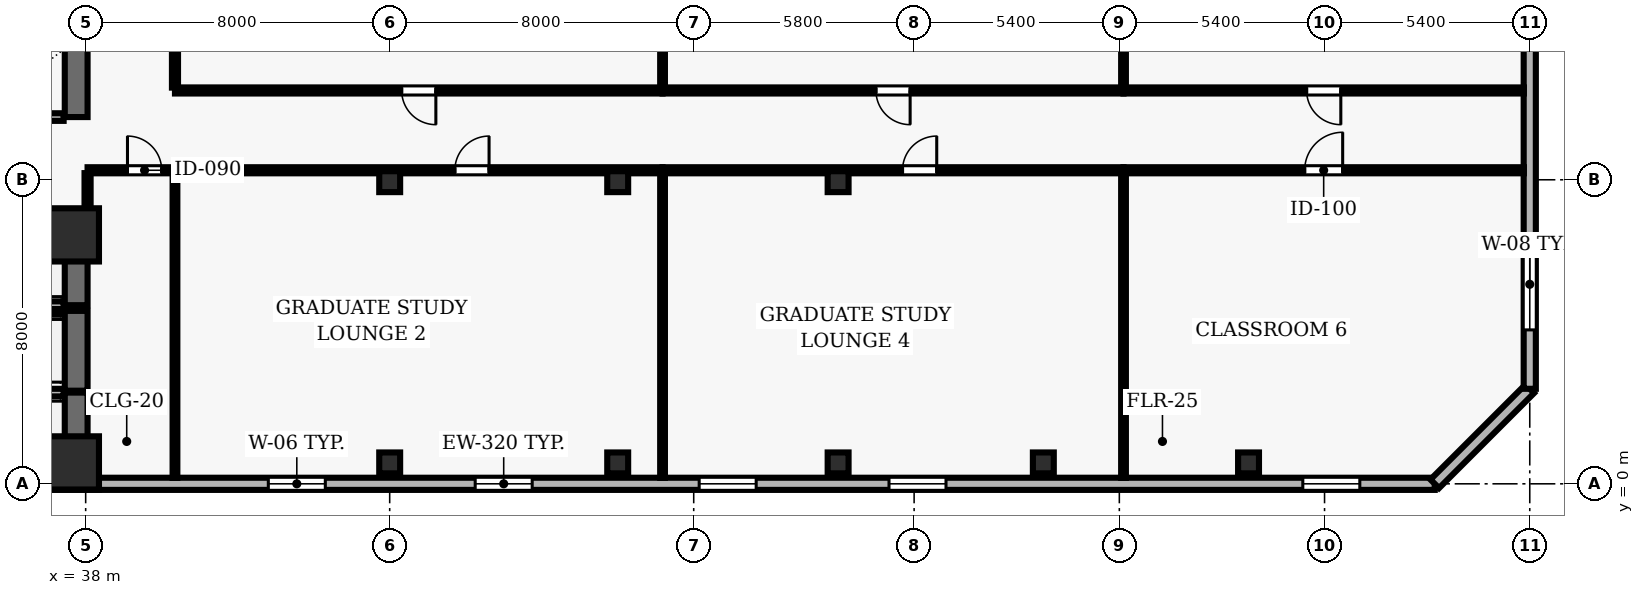
"""IFC4 building model, lengths in metres.
Left out: names, types, materials, properties, quantities, classifications, styles, units other than length and angle.
Written with IfcOpenShell. Run it as: python <this file> out.ifc"""

import sys

from ifc_helpers import new_model, si_unit, direction, frame, frame_2d, origin, origin_2d, place, context, subcontext, project, spatial, rectangle, hollow_rectangle, extrude, element, fill, save


model = new_model("IFC4")
c1 = context("Model", 3, precision=1e-05, world=origin(), true_north=direction((0.0, 1.0)))
c2 = subcontext(c1, "Body", "Model", "MODEL_VIEW")
j1 = project(units=[si_unit("LENGTHUNIT", "METRE"), si_unit("PLANEANGLEUNIT", "RADIAN")], contexts=[c1])
p1 = place(None, origin())
s1 = spatial("IfcSite", under=j1, at=p1, CompositionType="ELEMENT")
p2 = place(p1, origin())
s2 = spatial("IfcBuilding", under=s1, at=p2, CompositionType="ELEMENT")
p3 = place(p2, frame((0.0, 0.0, 73.9)))
s3 = spatial("IfcBuildingStorey", under=s2, at=p3, CompositionType="ELEMENT", Elevation=73.9)
for number, where, z_axis, x_axis in (
    (1, (37.65, 0.55, 0.0), (0.0, 0.0, 1.0), (1.0, 0.0, 0.0)),
    (2, (37.65, 6.55, 0.0), (0.0, 0.0, 1.0), (1.0, 0.0, 0.0)),
):
    element("IfcColumn", number, at=place(p3, frame(where, z_axis=z_axis, x_axis=x_axis)), inside=s3, PredefinedType="COLUMN", context=c2, shape_type="SweptSolid", body=[
        extrude(rectangle(XDim=1.4, YDim=1.4, at=origin_2d()), origin(), (0.0, 0.0, 1.0), 3.9),
    ])
for number, where, z_axis, x_axis in (
    (3, (46.0, 0.55, 0.0), (0.0, 0.0, 1.0), (1.0, 0.0, 0.0)),
    (4, (46.0, 7.95, 0.0), (0.0, 0.0, 1.0), (1.0, 0.0, 0.0)),
    (5, (52.0, 0.55, 0.0), (0.0, 0.0, 1.0), (1.0, 0.0, 0.0)),
    (6, (52.0, 7.95, 0.0), (0.0, 0.0, 1.0), (1.0, 0.0, 0.0)),
    (7, (57.8, 0.55, 0.0), (0.0, 0.0, 1.0), (1.0, 0.0, 0.0)),
    (8, (57.8, 7.95, 0.0), (0.0, 0.0, 1.0), (1.0, 0.0, 0.0)),
    (9, (63.2, 0.55, 0.0), (0.0, 0.0, 1.0), (1.0, 0.0, 0.0)),
    (10, (68.6, 0.55, 0.0), (0.0, 0.0, 1.0), (1.0, 0.0, 0.0)),
):
    element("IfcColumn", number, at=place(p3, frame(where, z_axis=z_axis, x_axis=x_axis)), inside=s3, PredefinedType="COLUMN", context=c2, shape_type="SweptSolid", body=[
        extrude(hollow_rectangle(XDim=0.55, YDim=0.55, WallThickness=0.025, at=origin_2d()), origin(), (0.0, 0.0, 1.0), 3.9),
    ])
p4 = place(p3, frame((24.5, 0.0, 0.0), z_axis=(0.0, 0.0, 1.0), x_axis=(1.0, 0.0, 0.0)))
e11 = element("IfcWall", 11, at=p4, inside=s3, PredefinedType="SOLIDWALL", context=c2, shape_type="SweptSolid", body=[
    extrude(rectangle(XDim=49.0, YDim=0.32, at=frame_2d((24.5, 0.0))), origin(), (0.0, 0.0, 1.0), 3.69),
])
p5 = place(p4, frame((1.972, 0.0, 0.9)))
e12 = element("IfcOpeningElement", 12, at=p5, cuts=e11, PredefinedType="OPENING", context=c2, shape_type="SweptSolid", body=[
    extrude(rectangle(XDim=1.5, YDim=1.8, at=frame_2d((0.75, 0.9))), frame((0.0, 0.17, 0.0), z_axis=(0.0, -1.0, 0.0), x_axis=(1.0, 0.0, 0.0)), (0.0, 0.0, 1.0), 0.34),
])
p6 = place(p4, frame((8.317, 0.0, 0.9)))
e13 = element("IfcOpeningElement", 13, at=p6, cuts=e11, PredefinedType="OPENING", context=c2, shape_type="SweptSolid", body=[
    extrude(rectangle(XDim=1.5, YDim=1.8, at=frame_2d((0.75, 0.9))), frame((0.0, 0.17, 0.0), z_axis=(0.0, -1.0, 0.0), x_axis=(1.0, 0.0, 0.0)), (0.0, 0.0, 1.0), 0.34),
])
p7 = place(p4, frame((18.306, 0.0, 0.9)))
e14 = element("IfcOpeningElement", 14, at=p7, cuts=e11, PredefinedType="OPENING", context=c2, shape_type="SweptSolid", body=[
    extrude(rectangle(XDim=1.5, YDim=1.8, at=frame_2d((0.75, 0.9))), frame((0.0, 0.17, 0.0), z_axis=(0.0, -1.0, 0.0), x_axis=(1.0, 0.0, 0.0)), (0.0, 0.0, 1.0), 0.34),
])
p8 = place(p4, frame((23.75, 0.0, 0.9)))
e15 = element("IfcOpeningElement", 15, at=p8, cuts=e11, PredefinedType="OPENING", context=c2, shape_type="SweptSolid", body=[
    extrude(rectangle(XDim=1.5, YDim=1.8, at=frame_2d((0.75, 0.9))), frame((0.0, 0.17, 0.0), z_axis=(0.0, -1.0, 0.0), x_axis=(1.0, 0.0, 0.0)), (0.0, 0.0, 1.0), 0.34),
])
p9 = place(p4, frame((29.644, 0.0, 0.9)))
e16 = element("IfcOpeningElement", 16, at=p9, cuts=e11, PredefinedType="OPENING", context=c2, shape_type="SweptSolid", body=[
    extrude(rectangle(XDim=1.5, YDim=1.8, at=frame_2d((0.75, 0.9))), frame((0.0, 0.17, 0.0), z_axis=(0.0, -1.0, 0.0), x_axis=(1.0, 0.0, 0.0)), (0.0, 0.0, 1.0), 0.34),
])
p10 = place(p4, frame((34.639, 0.0, 0.9)))
e17 = element("IfcOpeningElement", 17, at=p10, cuts=e11, PredefinedType="OPENING", context=c2, shape_type="SweptSolid", body=[
    extrude(rectangle(XDim=1.5, YDim=1.8, at=frame_2d((0.75, 0.9))), frame((0.0, 0.17, 0.0), z_axis=(0.0, -1.0, 0.0), x_axis=(1.0, 0.0, 0.0)), (0.0, 0.0, 1.0), 0.34),
])
p11 = place(p4, frame((45.528, 0.0, 0.9)))
e18 = element("IfcOpeningElement", 18, at=p11, cuts=e11, PredefinedType="OPENING", context=c2, shape_type="SweptSolid", body=[
    extrude(rectangle(XDim=1.5, YDim=1.8, at=frame_2d((0.75, 0.9))), frame((0.0, 0.17, 0.0), z_axis=(0.0, -1.0, 0.0), x_axis=(1.0, 0.0, 0.0)), (0.0, 0.0, 1.0), 0.34),
])
p12 = place(p3, frame((73.5, 0.0, 0.0), z_axis=(0.0, 0.0, 1.0), x_axis=(0.707106781187, 0.707106781187, 0.0)))
e19 = element("IfcWall", 19, at=p12, inside=s3, PredefinedType="SOLIDWALL", context=c2, shape_type="SweptSolid", body=[
    extrude(rectangle(XDim=3.536, YDim=0.32, at=frame_2d((1.768, 0.0))), origin(), (0.0, 0.0, 1.0), 3.69),
])
p13 = place(p3, frame((76.0, 2.5, 0.0), z_axis=(0.0, 0.0, 1.0), x_axis=(0.0, 1.0, 0.0)))
e20 = element("IfcWall", 20, at=p13, inside=s3, PredefinedType="SOLIDWALL", context=c2, shape_type="SweptSolid", body=[
    extrude(rectangle(XDim=11.0, YDim=0.32, at=frame_2d((5.5, 0.0))), origin(), (0.0, 0.0, 1.0), 3.69),
])
p14 = place(p13, frame((1.55, 0.0, 0.9)))
e21 = element("IfcOpeningElement", 21, at=p14, cuts=e20, PredefinedType="OPENING", context=c2, shape_type="SweptSolid", body=[
    extrude(rectangle(XDim=2.4, YDim=1.8, at=frame_2d((1.2, 0.9))), frame((0.0, 0.17, 0.0), z_axis=(0.0, -1.0, 0.0), x_axis=(1.0, 0.0, 0.0)), (0.0, 0.0, 1.0), 0.34),
])
p15 = place(p3, frame((37.75, 0.3, 0.0), z_axis=(0.0, 0.0, 1.0), x_axis=(0.0, 1.0, 0.0)))
e22 = element("IfcWall", 22, at=p15, inside=s3, PredefinedType="SHEAR", context=c2, shape_type="SweptSolid", body=[
    extrude(rectangle(XDim=2.1, YDim=0.6, at=frame_2d((1.05, 0.0))), origin(), (0.0, 0.0, 1.0), 3.69),
])
for number, where, z_axis, x_axis in (
    (23, (35.28, 0.3, 0.0), (0.0, 0.0, 1.0), (1.0, 0.0, 0.0)),
    (24, (37.42, 2.4, 0.0), (0.0, 0.0, 1.0), (-1.0, 0.0, 0.0)),
):
    element("IfcWall", number, at=place(p3, frame(where, z_axis=z_axis, x_axis=x_axis)), inside=s3, PredefinedType="SOLIDWALL", context=c2, shape_type="SweptSolid", body=[
        extrude(rectangle(XDim=2.14, YDim=0.2, at=frame_2d((1.07, 0.0))), origin(), (0.0, 0.0, 1.0), 3.69),
    ])
p16 = place(p3, frame((37.75, 2.45, 0.0), z_axis=(0.0, 0.0, 1.0), x_axis=(0.0, 1.0, 0.0)))
e25 = element("IfcWall", 25, at=p16, inside=s3, PredefinedType="SHEAR", context=c2, shape_type="SweptSolid", body=[
    extrude(rectangle(XDim=2.1, YDim=0.6, at=frame_2d((1.05, 0.0))), origin(), (0.0, 0.0, 1.0), 3.69),
])
p17 = place(p3, frame((37.42, 4.55, 0.0), z_axis=(0.0, 0.0, 1.0), x_axis=(-1.0, 0.0, 0.0)))
e26 = element("IfcWall", 26, at=p17, inside=s3, PredefinedType="SOLIDWALL", context=c2, shape_type="SweptSolid", body=[
    extrude(rectangle(XDim=2.14, YDim=0.2, at=frame_2d((1.07, 0.0))), origin(), (0.0, 0.0, 1.0), 3.69),
])
p18 = place(p3, frame((37.75, 4.7, 0.0), z_axis=(0.0, 0.0, 1.0), x_axis=(0.0, 1.0, 0.0)))
e27 = element("IfcWall", 27, at=p18, inside=s3, PredefinedType="SHEAR", context=c2, shape_type="SweptSolid", body=[
    extrude(rectangle(XDim=2.25, YDim=0.6, at=frame_2d((1.125, 0.0))), origin(), (0.0, 0.0, 1.0), 3.69),
])
for number, where, z_axis, x_axis in (
    (28, (35.28, 4.7, 0.0), (0.0, 0.0, 1.0), (1.0, 0.0, 0.0)),
    (29, (37.42, 6.95, 0.0), (0.0, 0.0, 1.0), (-1.0, 0.0, 0.0)),
):
    element("IfcWall", number, at=place(p3, frame(where, z_axis=z_axis, x_axis=x_axis)), inside=s3, PredefinedType="SOLIDWALL", context=c2, shape_type="SweptSolid", body=[
        extrude(rectangle(XDim=2.14, YDim=0.2, at=frame_2d((1.07, 0.0))), origin(), (0.0, 0.0, 1.0), 3.69),
    ])
p19 = place(p3, frame((37.75, 9.65, 0.0), z_axis=(0.0, 0.0, 1.0), x_axis=(0.0, 1.0, 0.0)))
e30 = element("IfcWall", 30, at=p19, inside=s3, PredefinedType="SHEAR", context=c2, shape_type="SweptSolid", body=[
    extrude(rectangle(XDim=1.9, YDim=0.6, at=frame_2d((0.95, 0.0))), origin(), (0.0, 0.0, 1.0), 3.69),
])
p20 = place(p3, frame((35.28, 9.65, 0.0), z_axis=(0.0, 0.0, 1.0), x_axis=(1.0, 0.0, 0.0)))
e31 = element("IfcWall", 31, at=p20, inside=s3, PredefinedType="SOLIDWALL", context=c2, shape_type="SweptSolid", body=[
    extrude(rectangle(XDim=2.14, YDim=0.2, at=frame_2d((1.07, 0.0))), origin(), (0.0, 0.0, 1.0), 3.69),
])
p21 = place(p3, frame((38.05, 8.25, 0.0), z_axis=(0.0, 0.0, 1.0), x_axis=(1.0, 0.0, 0.0)))
e32 = element("IfcWall", 32, at=p21, inside=s3, PredefinedType="PARTITIONING", context=c2, shape_type="SweptSolid", body=[
    extrude(rectangle(XDim=2.3, YDim=0.16, at=frame_2d((1.15, 0.0))), origin(), (0.0, 0.0, 1.0), 3.055),
])
p22 = place(p21, frame((1.05, 0.0, 0.0)))
e33 = element("IfcOpeningElement", 33, at=p22, cuts=e32, PredefinedType="OPENING", context=c2, shape_type="SweptSolid", body=[
    extrude(rectangle(XDim=0.9, YDim=2.1, at=frame_2d((0.45, 1.05))), frame((0.0, 0.09, 0.0), z_axis=(0.0, -1.0, 0.0), x_axis=(1.0, 0.0, 0.0)), (0.0, 0.0, 1.0), 0.18),
])
p23 = place(p3, frame((40.35, 8.25, 0.0), z_axis=(0.0, 0.0, 1.0), x_axis=(1.0, 0.0, 0.0)))
e34 = element("IfcWall", 34, at=p23, inside=s3, PredefinedType="PARTITIONING", context=c2, shape_type="SweptSolid", body=[
    extrude(rectangle(XDim=12.83, YDim=0.16, at=frame_2d((6.415, 0.0))), origin(), (0.0, 0.0, 1.0), 3.055),
])
p24 = place(p23, frame((7.365, 0.0, 0.0)))
e35 = element("IfcOpeningElement", 35, at=p24, cuts=e34, PredefinedType="OPENING", context=c2, shape_type="SweptSolid", body=[
    extrude(rectangle(XDim=0.9, YDim=2.1, at=frame_2d((0.45, 1.05))), frame((0.0, 0.09, 0.0), z_axis=(0.0, -1.0, 0.0), x_axis=(1.0, 0.0, 0.0)), (0.0, 0.0, 1.0), 0.18),
])
p25 = place(p3, frame((53.18, 8.25, 0.0), z_axis=(0.0, 0.0, 1.0), x_axis=(1.0, 0.0, 0.0)))
e36 = element("IfcWall", 36, at=p25, inside=s3, PredefinedType="PARTITIONING", context=c2, shape_type="SweptSolid", body=[
    extrude(rectangle(XDim=12.13, YDim=0.16, at=frame_2d((6.065, 0.0))), origin(), (0.0, 0.0, 1.0), 3.055),
])
p26 = place(p25, frame((6.315, 0.0, 0.0)))
e37 = element("IfcOpeningElement", 37, at=p26, cuts=e36, PredefinedType="OPENING", context=c2, shape_type="SweptSolid", body=[
    extrude(rectangle(XDim=0.9, YDim=2.1, at=frame_2d((0.45, 1.05))), frame((0.0, 0.09, 0.0), z_axis=(0.0, -1.0, 0.0), x_axis=(1.0, 0.0, 0.0)), (0.0, 0.0, 1.0), 0.18),
])
p27 = place(p3, frame((53.18, 10.35, 0.0), z_axis=(0.0, 0.0, 1.0), x_axis=(-1.0, 0.0, 0.0)))
e38 = element("IfcWall", 38, at=p27, inside=s3, PredefinedType="PARTITIONING", context=c2, shape_type="SweptSolid", body=[
    extrude(rectangle(XDim=12.83, YDim=0.16, at=frame_2d((6.415, 0.0))), origin(), (0.0, 0.0, 1.0), 3.277),
])
p28 = place(p27, frame((5.965, 0.0, 0.0)))
e39 = element("IfcOpeningElement", 39, at=p28, cuts=e38, PredefinedType="OPENING", context=c2, shape_type="SweptSolid", body=[
    extrude(rectangle(XDim=0.9, YDim=2.1, at=frame_2d((0.45, 1.05))), frame((0.0, 0.09, 0.0), z_axis=(0.0, -1.0, 0.0), x_axis=(1.0, 0.0, 0.0)), (0.0, 0.0, 1.0), 0.18),
])
p29 = place(p3, frame((65.31, 8.25, 0.0), z_axis=(0.0, 0.0, 1.0), x_axis=(1.0, 0.0, 0.0)))
e40 = element("IfcWall", 40, at=p29, inside=s3, PredefinedType="PARTITIONING", context=c2, shape_type="SweptSolid", body=[
    extrude(rectangle(XDim=10.535, YDim=0.16, at=frame_2d((5.268, 0.0))), origin(), (0.0, 0.0, 1.0), 3.69),
])
p30 = place(p29, frame((4.767, 0.0, 0.0)))
e41 = element("IfcOpeningElement", 41, at=p30, cuts=e40, PredefinedType="OPENING", context=c2, shape_type="SweptSolid", body=[
    extrude(rectangle(XDim=1.0, YDim=2.1, at=frame_2d((0.5, 1.05))), frame((0.0, 0.09, 0.0), z_axis=(0.0, -1.0, 0.0), x_axis=(1.0, 0.0, 0.0)), (0.0, 0.0, 1.0), 0.18),
])
p31 = place(p3, frame((65.31, 10.35, 0.0), z_axis=(0.0, 0.0, 1.0), x_axis=(-1.0, 0.0, 0.0)))
e42 = element("IfcWall", 42, at=p31, inside=s3, PredefinedType="PARTITIONING", context=c2, shape_type="SweptSolid", body=[
    extrude(rectangle(XDim=12.13, YDim=0.16, at=frame_2d((6.065, 0.0))), origin(), (0.0, 0.0, 1.0), 3.277),
])
p32 = place(p31, frame((5.615, 0.0, 0.0)))
e43 = element("IfcOpeningElement", 43, at=p32, cuts=e42, PredefinedType="OPENING", context=c2, shape_type="SweptSolid", body=[
    extrude(rectangle(XDim=0.9, YDim=2.1, at=frame_2d((0.45, 1.05))), frame((0.0, 0.09, 0.0), z_axis=(0.0, -1.0, 0.0), x_axis=(1.0, 0.0, 0.0)), (0.0, 0.0, 1.0), 0.18),
])
p33 = place(p3, frame((75.845, 10.35, 0.0), z_axis=(0.0, 0.0, 1.0), x_axis=(-1.0, 0.0, 0.0)))
e44 = element("IfcWall", 44, at=p33, inside=s3, PredefinedType="PARTITIONING", context=c2, shape_type="SweptSolid", body=[
    extrude(rectangle(XDim=10.535, YDim=0.16, at=frame_2d((5.268, 0.0))), origin(), (0.0, 0.0, 1.0), 3.277),
])
p34 = place(p33, frame((4.817, 0.0, 0.0)))
e45 = element("IfcOpeningElement", 45, at=p34, cuts=e44, PredefinedType="OPENING", context=c2, shape_type="SweptSolid", body=[
    extrude(rectangle(XDim=0.9, YDim=2.1, at=frame_2d((0.45, 1.05))), frame((0.0, 0.09, 0.0), z_axis=(0.0, -1.0, 0.0), x_axis=(1.0, 0.0, 0.0)), (0.0, 0.0, 1.0), 0.18),
])
p35 = place(p3, frame((38.05, 7.05, 0.0), z_axis=(0.0, 0.0, 1.0), x_axis=(0.0, 1.0, 0.0)))
e46 = element("IfcWall", 46, at=p35, inside=s3, PredefinedType="PARTITIONING", context=c2, shape_type="SweptSolid", body=[
    extrude(rectangle(XDim=1.125, YDim=0.16, at=frame_2d((0.562, 0.0))), origin(), (0.0, 0.0, 1.0), 3.055),
])
p36 = place(p3, frame((40.35, 0.155, 0.0), z_axis=(0.0, 0.0, 1.0), x_axis=(0.0, 1.0, 0.0)))
e47 = element("IfcWall", 47, at=p36, inside=s3, PredefinedType="PARTITIONING", context=c2, shape_type="SweptSolid", body=[
    extrude(rectangle(XDim=8.02, YDim=0.125, at=frame_2d((4.01, 0.0))), origin(), (0.0, 0.0, 1.0), 3.69),
])
p37 = place(p3, frame((40.35, 10.425, 0.0), z_axis=(0.0, 0.0, 1.0), x_axis=(0.0, 1.0, 0.0)))
e48 = element("IfcWall", 48, at=p37, inside=s3, PredefinedType="PARTITIONING", context=c2, shape_type="SweptSolid", body=[
    extrude(rectangle(XDim=5.5, YDim=0.16, at=frame_2d((2.75, 0.0))), origin(), (0.0, 0.0, 1.0), 3.277),
])
p38 = place(p3, frame((53.18, 0.155, 0.0), z_axis=(0.0, 0.0, 1.0), x_axis=(0.0, 1.0, 0.0)))
e49 = element("IfcWall", 49, at=p38, inside=s3, PredefinedType="PARTITIONING", context=c2, shape_type="SweptSolid", body=[
    extrude(rectangle(XDim=8.02, YDim=0.125, at=frame_2d((4.01, 0.0))), origin(), (0.0, 0.0, 1.0), 3.69),
])
p39 = place(p3, frame((53.18, 10.425, 0.0), z_axis=(0.0, 0.0, 1.0), x_axis=(0.0, 1.0, 0.0)))
e50 = element("IfcWall", 50, at=p39, inside=s3, PredefinedType="PARTITIONING", context=c2, shape_type="SweptSolid", body=[
    extrude(rectangle(XDim=5.42, YDim=0.125, at=frame_2d((2.71, 0.0))), origin(), (0.0, 0.0, 1.0), 3.69),
])
p40 = place(p3, frame((65.31, 0.155, 0.0), z_axis=(0.0, 0.0, 1.0), x_axis=(0.0, 1.0, 0.0)))
e51 = element("IfcWall", 51, at=p40, inside=s3, PredefinedType="PARTITIONING", context=c2, shape_type="SweptSolid", body=[
    extrude(rectangle(XDim=8.02, YDim=0.125, at=frame_2d((4.01, 0.0))), origin(), (0.0, 0.0, 1.0), 3.69),
])
p41 = place(p3, frame((65.31, 10.425, 0.0), z_axis=(0.0, 0.0, 1.0), x_axis=(0.0, 1.0, 0.0)))
e52 = element("IfcWall", 52, at=p41, inside=s3, PredefinedType="PARTITIONING", context=c2, shape_type="SweptSolid", body=[
    extrude(rectangle(XDim=5.42, YDim=0.125, at=frame_2d((2.71, 0.0))), origin(), (0.0, 0.0, 1.0), 3.69),
])
p42 = place(p7, origin())
e53 = element("IfcWindow", 53, at=p42, inside=s3, PartitioningType="SINGLE_PANEL", PredefinedType="WINDOW", context=c2, shape_type="SweptSolid", body=[
    extrude(rectangle(XDim=1.5, YDim=1.8, at=frame_2d((0.75, 0.9))), frame((0.0, 0.03, 0.0), z_axis=(0.0, -1.0, 0.0), x_axis=(1.0, 0.0, 0.0)), (0.0, 0.0, 1.0), 0.06),
])
fill(e14, e53)
p43 = place(p8, origin())
e54 = element("IfcWindow", 54, at=p43, inside=s3, PartitioningType="SINGLE_PANEL", PredefinedType="WINDOW", context=c2, shape_type="SweptSolid", body=[
    extrude(rectangle(XDim=1.5, YDim=1.8, at=frame_2d((0.75, 0.9))), frame((0.0, 0.03, 0.0), z_axis=(0.0, -1.0, 0.0), x_axis=(1.0, 0.0, 0.0)), (0.0, 0.0, 1.0), 0.06),
])
fill(e15, e54)
p44 = place(p9, origin())
e55 = element("IfcWindow", 55, at=p44, inside=s3, PartitioningType="SINGLE_PANEL", PredefinedType="WINDOW", context=c2, shape_type="SweptSolid", body=[
    extrude(rectangle(XDim=1.5, YDim=1.8, at=frame_2d((0.75, 0.9))), frame((0.0, 0.03, 0.0), z_axis=(0.0, -1.0, 0.0), x_axis=(1.0, 0.0, 0.0)), (0.0, 0.0, 1.0), 0.06),
])
fill(e16, e55)
p45 = place(p10, origin())
e56 = element("IfcWindow", 56, at=p45, inside=s3, PartitioningType="SINGLE_PANEL", PredefinedType="WINDOW", context=c2, shape_type="SweptSolid", body=[
    extrude(rectangle(XDim=1.5, YDim=1.8, at=frame_2d((0.75, 0.9))), frame((0.0, 0.03, 0.0), z_axis=(0.0, -1.0, 0.0), x_axis=(1.0, 0.0, 0.0)), (0.0, 0.0, 1.0), 0.06),
])
fill(e17, e56)
p46 = place(p11, origin())
e57 = element("IfcWindow", 57, at=p46, inside=s3, PartitioningType="SINGLE_PANEL", PredefinedType="WINDOW", context=c2, shape_type="SweptSolid", body=[
    extrude(rectangle(XDim=1.5, YDim=1.8, at=frame_2d((0.75, 0.9))), frame((0.0, 0.03, 0.0), z_axis=(0.0, -1.0, 0.0), x_axis=(1.0, 0.0, 0.0)), (0.0, 0.0, 1.0), 0.06),
])
fill(e18, e57)
p47 = place(p14, origin())
e58 = element("IfcWindow", 58, at=p47, inside=s3, PartitioningType="SINGLE_PANEL", PredefinedType="WINDOW", context=c2, shape_type="SweptSolid", body=[
    extrude(rectangle(XDim=2.4, YDim=1.8, at=frame_2d((1.2, 0.9))), frame((0.0, 0.03, 0.0), z_axis=(0.0, -1.0, 0.0), x_axis=(1.0, 0.0, 0.0)), (0.0, 0.0, 1.0), 0.06),
])
fill(e21, e58)
p48 = place(p22, origin())
e59 = element("IfcDoor", 59, at=p48, inside=s3, OperationType="SINGLE_SWING_LEFT", PredefinedType="DOOR", context=c2, shape_type="SweptSolid", body=[
    extrude(rectangle(XDim=0.9, YDim=2.1, at=frame_2d((0.45, 1.05))), frame((0.0, 0.025, 0.0), z_axis=(0.0, -1.0, 0.0), x_axis=(1.0, 0.0, 0.0)), (0.0, 0.0, 1.0), 0.05),
])
fill(e33, e59)
p49 = place(p24, origin())
e60 = element("IfcDoor", 60, at=p49, inside=s3, OperationType="SINGLE_SWING_RIGHT", PredefinedType="DOOR", context=c2, shape_type="SweptSolid", body=[
    extrude(rectangle(XDim=0.9, YDim=2.1, at=frame_2d((0.45, 1.05))), frame((0.0, 0.025, 0.0), z_axis=(0.0, -1.0, 0.0), x_axis=(1.0, 0.0, 0.0)), (0.0, 0.0, 1.0), 0.05),
])
fill(e35, e60)
p50 = place(p28, origin())
e61 = element("IfcDoor", 61, at=p50, inside=s3, OperationType="SINGLE_SWING_LEFT", PredefinedType="DOOR", context=c2, shape_type="SweptSolid", body=[
    extrude(rectangle(XDim=0.9, YDim=2.1, at=frame_2d((0.45, 1.05))), frame((0.0, 0.025, 0.0), z_axis=(0.0, -1.0, 0.0), x_axis=(1.0, 0.0, 0.0)), (0.0, 0.0, 1.0), 0.05),
])
fill(e39, e61)
p51 = place(p26, origin())
e62 = element("IfcDoor", 62, at=p51, inside=s3, OperationType="SINGLE_SWING_RIGHT", PredefinedType="DOOR", context=c2, shape_type="SweptSolid", body=[
    extrude(rectangle(XDim=0.9, YDim=2.1, at=frame_2d((0.45, 1.05))), frame((0.0, 0.025, 0.0), z_axis=(0.0, -1.0, 0.0), x_axis=(1.0, 0.0, 0.0)), (0.0, 0.0, 1.0), 0.05),
])
fill(e37, e62)
p52 = place(p32, origin())
e63 = element("IfcDoor", 63, at=p52, inside=s3, OperationType="SINGLE_SWING_LEFT", PredefinedType="DOOR", context=c2, shape_type="SweptSolid", body=[
    extrude(rectangle(XDim=0.9, YDim=2.1, at=frame_2d((0.45, 1.05))), frame((0.0, 0.025, 0.0), z_axis=(0.0, -1.0, 0.0), x_axis=(1.0, 0.0, 0.0)), (0.0, 0.0, 1.0), 0.05),
])
fill(e43, e63)
p53 = place(p30, origin())
e64 = element("IfcDoor", 64, at=p53, inside=s3, OperationType="SINGLE_SWING_RIGHT", PredefinedType="DOOR", context=c2, shape_type="SweptSolid", body=[
    extrude(rectangle(XDim=1.0, YDim=2.1, at=frame_2d((0.5, 1.05))), frame((0.0, 0.025, 0.0), z_axis=(0.0, -1.0, 0.0), x_axis=(1.0, 0.0, 0.0)), (0.0, 0.0, 1.0), 0.05),
])
fill(e41, e64)
p54 = place(p34, origin())
e65 = element("IfcDoor", 65, at=p54, inside=s3, OperationType="SINGLE_SWING_LEFT", PredefinedType="DOOR", context=c2, shape_type="SweptSolid", body=[
    extrude(rectangle(XDim=0.9, YDim=2.1, at=frame_2d((0.45, 1.05))), frame((0.0, 0.025, 0.0), z_axis=(0.0, -1.0, 0.0), x_axis=(1.0, 0.0, 0.0)), (0.0, 0.0, 1.0), 0.05),
])
fill(e45, e65)
save(model, sys.argv[1])
